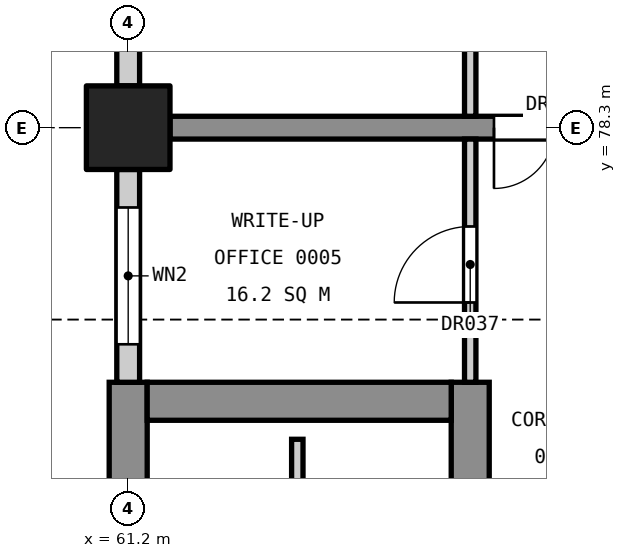
"""IFC4 building model, lengths in metres.
Left out: names, types, materials, properties, quantities, classifications, styles, units other than length and angle.
Written with IfcOpenShell. Run it as: python <this file> out.ifc"""

import sys

from ifc_helpers import new_model, si_unit, direction, frame, frame_2d, origin, origin_2d, place, context, subcontext, project, spatial, rectangle, extrude, element, fill, save


model = new_model("IFC4")
c1 = context("Model", 3, precision=1e-05, world=origin(), true_north=direction((0.0, 1.0)))
c2 = subcontext(c1, "Body", "Model", "MODEL_VIEW")
j1 = project(units=[si_unit("LENGTHUNIT", "METRE"), si_unit("PLANEANGLEUNIT", "RADIAN")], contexts=[c1])
p1 = place(None, origin())
s1 = spatial("IfcSite", under=j1, at=p1, CompositionType="ELEMENT")
p2 = place(p1, origin())
s2 = spatial("IfcBuilding", under=s1, at=p2, CompositionType="ELEMENT")
p3 = place(p2, origin())
s3 = spatial("IfcBuildingStorey", under=s2, at=p3, CompositionType="ELEMENT", Elevation=0.0)
p4 = place(p3, frame((61.2, 78.3, 0.0), z_axis=(0.0, 0.0, 1.0), x_axis=(1.0, 0.0, 0.0)))
e1 = element("IfcColumn", 1, at=p4, inside=s3, PredefinedType="COLUMN", context=c2, shape_type="SweptSolid", body=[
    extrude(rectangle(XDim=1.1, YDim=1.1, at=origin_2d()), origin(), (0.0, 0.0, 1.0), 6.0),
])
p5 = place(p3, frame((61.2, 60.05, 0.0), z_axis=(0.0, 0.0, 1.0), x_axis=(0.0, 1.0, 0.0)))
e2 = element("IfcWall", 2, at=p5, inside=s3, PredefinedType="SHEAR", context=c2, shape_type="SweptSolid", body=[
    extrude(rectangle(XDim=14.9, YDim=0.5, at=frame_2d((7.45, 0.0))), origin(), (0.0, 0.0, 1.0), 5.7),
])
p6 = place(p5, frame((0.55, 0.0, 0.0)))
e3 = element("IfcOpeningElement", 3, at=p6, cuts=e2, PredefinedType="OPENING", context=c2, shape_type="SweptSolid", body=[
    extrude(rectangle(XDim=1.4, YDim=2.1, at=frame_2d((0.7, 1.05))), frame((0.0, 0.26, 0.0), z_axis=(0.0, -1.0, 0.0), x_axis=(1.0, 0.0, 0.0)), (0.0, 0.0, 1.0), 0.52),
])
p7 = place(p5, frame((6.58, 0.0, 3.4)))
e4 = element("IfcOpeningElement", 4, at=p7, cuts=e2, PredefinedType="OPENING", context=c2, shape_type="SweptSolid", body=[
    extrude(rectangle(XDim=1.2, YDim=0.9, at=frame_2d((0.6, 0.45))), frame((0.0, 0.26, 0.0), z_axis=(0.0, -1.0, 0.0), x_axis=(1.0, 0.0, 0.0)), (0.0, 0.0, 1.0), 0.52),
])
p8 = place(p3, frame((65.7, 60.05, 0.0), z_axis=(0.0, 0.0, 1.0), x_axis=(0.0, 1.0, 0.0)))
e5 = element("IfcWall", 5, at=p8, inside=s3, PredefinedType="SHEAR", context=c2, shape_type="SweptSolid", body=[
    extrude(rectangle(XDim=14.9, YDim=0.5, at=frame_2d((7.45, 0.0))), origin(), (0.0, 0.0, 1.0), 5.7),
])
p9 = place(p8, frame((0.55, 0.0, 0.0)))
e6 = element("IfcOpeningElement", 6, at=p9, cuts=e5, PredefinedType="OPENING", context=c2, shape_type="SweptSolid", body=[
    extrude(rectangle(XDim=1.4, YDim=2.1, at=frame_2d((0.7, 1.05))), frame((0.0, 0.26, 0.0), z_axis=(0.0, -1.0, 0.0), x_axis=(1.0, 0.0, 0.0)), (0.0, 0.0, 1.0), 0.52),
])
p10 = place(p8, frame((8.85, 0.0, 0.0)))
e7 = element("IfcOpeningElement", 7, at=p10, cuts=e5, PredefinedType="OPENING", context=c2, shape_type="SweptSolid", body=[
    extrude(rectangle(XDim=1.1, YDim=2.1, at=frame_2d((0.55, 1.05))), frame((0.0, 0.26, 0.0), z_axis=(0.0, -1.0, 0.0), x_axis=(1.0, 0.0, 0.0)), (0.0, 0.0, 1.0), 0.52),
])
p11 = place(p8, frame((11.4, 0.0, 0.0)))
e8 = element("IfcOpeningElement", 8, at=p11, cuts=e5, PredefinedType="OPENING", context=c2, shape_type="SweptSolid", body=[
    extrude(rectangle(XDim=1.1, YDim=2.1, at=frame_2d((0.55, 1.05))), frame((0.0, 0.26, 0.0), z_axis=(0.0, -1.0, 0.0), x_axis=(1.0, 0.0, 0.0)), (0.0, 0.0, 1.0), 0.52),
])
p12 = place(p3, frame((61.45, 74.7, 0.0), z_axis=(0.0, 0.0, 1.0), x_axis=(1.0, 0.0, 0.0)))
e9 = element("IfcWall", 9, at=p12, inside=s3, PredefinedType="SHEAR", context=c2, shape_type="SweptSolid", body=[
    extrude(rectangle(XDim=4.0, YDim=0.5, at=frame_2d((2.0, 0.0))), origin(), (0.0, 0.0, 1.0), 5.7),
])
p13 = place(p3, frame((61.75, 78.3, 0.0), z_axis=(0.0, 0.0, 1.0), x_axis=(1.0, 0.0, 0.0)))
e10 = element("IfcWall", 10, at=p13, inside=s3, PredefinedType="SHEAR", context=c2, shape_type="SweptSolid", body=[
    extrude(rectangle(XDim=6.1, YDim=0.3, at=frame_2d((3.05, 0.0))), origin(), (0.0, 0.0, 1.0), 5.7),
])
p14 = place(p13, frame((4.262, 0.0, 0.0)))
e11 = element("IfcOpeningElement", 11, at=p14, cuts=e10, PredefinedType="OPENING", context=c2, shape_type="SweptSolid", body=[
    extrude(rectangle(XDim=1.6, YDim=2.1, at=frame_2d((0.8, 1.05))), frame((0.0, 0.16, 0.0), z_axis=(0.0, -1.0, 0.0), x_axis=(1.0, 0.0, 0.0)), (0.0, 0.0, 1.0), 0.32),
])
p15 = place(p3, frame((63.425, 73.3, 0.0), z_axis=(0.0, 0.0, 1.0), x_axis=(0.0, 1.0, 0.0)))
e12 = element("IfcWall", 12, at=p15, inside=s3, PredefinedType="SOLIDWALL", context=c2, shape_type="SweptSolid", body=[
    extrude(rectangle(XDim=0.9, YDim=0.15, at=frame_2d((0.45, 0.0))), origin(), (0.0, 0.0, 1.0), 6.0),
])
p16 = place(p3, frame((61.2, 74.95, 0.0), z_axis=(0.0, 0.0, 1.0), x_axis=(0.0, 1.0, 0.0)))
e13 = element("IfcWall", 13, at=p16, inside=s3, PredefinedType="STANDARD", context=c2, shape_type="SweptSolid", body=[
    extrude(rectangle(XDim=2.8, YDim=0.3, at=frame_2d((1.4, 0.0))), origin(), (0.0, 0.0, 1.0), 4.7),
])
p17 = place(p16, frame((0.5, 0.0, 0.9)))
e14 = element("IfcOpeningElement", 14, at=p17, cuts=e13, PredefinedType="OPENING", context=c2, shape_type="SweptSolid", body=[
    extrude(rectangle(XDim=1.8, YDim=3.0, at=frame_2d((0.9, 1.5))), frame((0.0, 0.16, 0.0), z_axis=(0.0, -1.0, 0.0), x_axis=(1.0, 0.0, 0.0)), (0.0, 0.0, 1.0), 0.32),
])
p18 = place(p3, frame((61.2, 78.85, 0.0), z_axis=(0.0, 0.0, 1.0), x_axis=(0.0, 1.0, 0.0)))
e15 = element("IfcWall", 15, at=p18, inside=s3, PredefinedType="STANDARD", context=c2, shape_type="SweptSolid", body=[
    extrude(rectangle(XDim=10.0, YDim=0.3, at=frame_2d((5.0, 0.0))), origin(), (0.0, 0.0, 1.0), 4.7),
])
p19 = place(p18, frame((0.625, 0.0, 0.9)))
e16 = element("IfcOpeningElement", 16, at=p19, cuts=e15, PredefinedType="OPENING", context=c2, shape_type="SweptSolid", body=[
    extrude(rectangle(XDim=1.8, YDim=3.0, at=frame_2d((0.9, 1.5))), frame((0.0, 0.16, 0.0), z_axis=(0.0, -1.0, 0.0), x_axis=(1.0, 0.0, 0.0)), (0.0, 0.0, 1.0), 0.32),
])
p20 = place(p18, frame((3.95, 0.0, 0.9)))
e17 = element("IfcOpeningElement", 17, at=p20, cuts=e15, PredefinedType="OPENING", context=c2, shape_type="SweptSolid", body=[
    extrude(rectangle(XDim=1.8, YDim=3.0, at=frame_2d((0.9, 1.5))), frame((0.0, 0.16, 0.0), z_axis=(0.0, -1.0, 0.0), x_axis=(1.0, 0.0, 0.0)), (0.0, 0.0, 1.0), 0.32),
])
p21 = place(p18, frame((7.425, 0.0, 0.9)))
e18 = element("IfcOpeningElement", 18, at=p21, cuts=e15, PredefinedType="OPENING", context=c2, shape_type="SweptSolid", body=[
    extrude(rectangle(XDim=1.8, YDim=3.0, at=frame_2d((0.9, 1.5))), frame((0.0, 0.16, 0.0), z_axis=(0.0, -1.0, 0.0), x_axis=(1.0, 0.0, 0.0)), (0.0, 0.0, 1.0), 0.32),
])
p22 = place(p3, frame((65.7, 74.95, 0.0), z_axis=(0.0, 0.0, 1.0), x_axis=(0.0, 1.0, 0.0)))
e19 = element("IfcWall", 19, at=p22, inside=s3, PredefinedType="PARTITIONING", context=c2, shape_type="SweptSolid", body=[
    extrude(rectangle(XDim=3.2, YDim=0.15, at=frame_2d((1.6, 0.0))), origin(), (0.0, 0.0, 1.0), 4.6),
])
p23 = place(p22, frame((1.05, 0.0, 0.0)))
e20 = element("IfcOpeningElement", 20, at=p23, cuts=e19, PredefinedType="OPENING", context=c2, shape_type="SweptSolid", body=[
    extrude(rectangle(XDim=1.0, YDim=2.1, at=frame_2d((0.5, 1.05))), frame((0.0, 0.085, 0.0), z_axis=(0.0, -1.0, 0.0), x_axis=(1.0, 0.0, 0.0)), (0.0, 0.0, 1.0), 0.17),
])
p24 = place(p3, frame((65.7, 78.45, 0.0), z_axis=(0.0, 0.0, 1.0), x_axis=(0.0, 1.0, 0.0)))
e21 = element("IfcWall", 21, at=p24, inside=s3, PredefinedType="PARTITIONING", context=c2, shape_type="SweptSolid", body=[
    extrude(rectangle(XDim=10.4, YDim=0.15, at=frame_2d((5.2, 0.0))), origin(), (0.0, 0.0, 1.0), 4.6),
])
p25 = place(p24, frame((8.35, 0.0, 0.0)))
e22 = element("IfcOpeningElement", 22, at=p25, cuts=e21, PredefinedType="OPENING", context=c2, shape_type="SweptSolid", body=[
    extrude(rectangle(XDim=1.0, YDim=2.1, at=frame_2d((0.5, 1.05))), frame((0.0, 0.085, 0.0), z_axis=(0.0, -1.0, 0.0), x_axis=(1.0, 0.0, 0.0)), (0.0, 0.0, 1.0), 0.17),
])
p26 = place(p24, frame((4.75, 0.0, 0.0)))
e23 = element("IfcOpeningElement", 23, at=p26, cuts=e21, PredefinedType="OPENING", context=c2, shape_type="SweptSolid", body=[
    extrude(rectangle(XDim=1.0, YDim=2.1, at=frame_2d((0.5, 1.05))), frame((0.0, 0.085, 0.0), z_axis=(0.0, -1.0, 0.0), x_axis=(1.0, 0.0, 0.0)), (0.0, 0.0, 1.0), 0.17),
])
p27 = place(p24, frame((1.15, 0.0, 0.0)))
e24 = element("IfcOpeningElement", 24, at=p27, cuts=e21, PredefinedType="OPENING", context=c2, shape_type="SweptSolid", body=[
    extrude(rectangle(XDim=1.0, YDim=2.1, at=frame_2d((0.5, 1.05))), frame((0.0, 0.085, 0.0), z_axis=(0.0, -1.0, 0.0), x_axis=(1.0, 0.0, 0.0)), (0.0, 0.0, 1.0), 0.17),
])
p28 = place(p17, origin())
e25 = element("IfcWindow", 25, at=p28, inside=s3, PartitioningType="SINGLE_PANEL", PredefinedType="WINDOW", context=c2, shape_type="SweptSolid", body=[
    extrude(rectangle(XDim=1.8, YDim=3.0, at=frame_2d((0.9, 1.5))), frame((0.0, 0.03, 0.0), z_axis=(0.0, -1.0, 0.0), x_axis=(1.0, 0.0, 0.0)), (0.0, 0.0, 1.0), 0.06),
])
fill(e14, e25)
p29 = place(p23, origin())
e26 = element("IfcDoor", 26, at=p29, inside=s3, OperationType="SINGLE_SWING_LEFT", PredefinedType="DOOR", context=c2, shape_type="SweptSolid", body=[
    extrude(rectangle(XDim=1.0, YDim=2.1, at=frame_2d((0.5, 1.05))), frame((0.0, 0.025, 0.0), z_axis=(0.0, -1.0, 0.0), x_axis=(1.0, 0.0, 0.0)), (0.0, 0.0, 1.0), 0.05),
])
fill(e20, e26)
p30 = place(p14, frame((1.6, 0.0, 0.0), z_axis=(0.0, 0.0, 1.0), x_axis=(-1.0, 0.0, 0.0)))
e27 = element("IfcDoor", 27, at=p30, inside=s3, OperationType="DOUBLE_DOOR_SINGLE_SWING", PredefinedType="DOOR", context=c2, shape_type="SweptSolid", body=[
    extrude(rectangle(XDim=1.6, YDim=2.1, at=frame_2d((0.8, 1.05))), frame((0.0, 0.025, 0.0), z_axis=(0.0, -1.0, 0.0), x_axis=(1.0, 0.0, 0.0)), (0.0, 0.0, 1.0), 0.05),
])
fill(e11, e27)
save(model, sys.argv[1])
